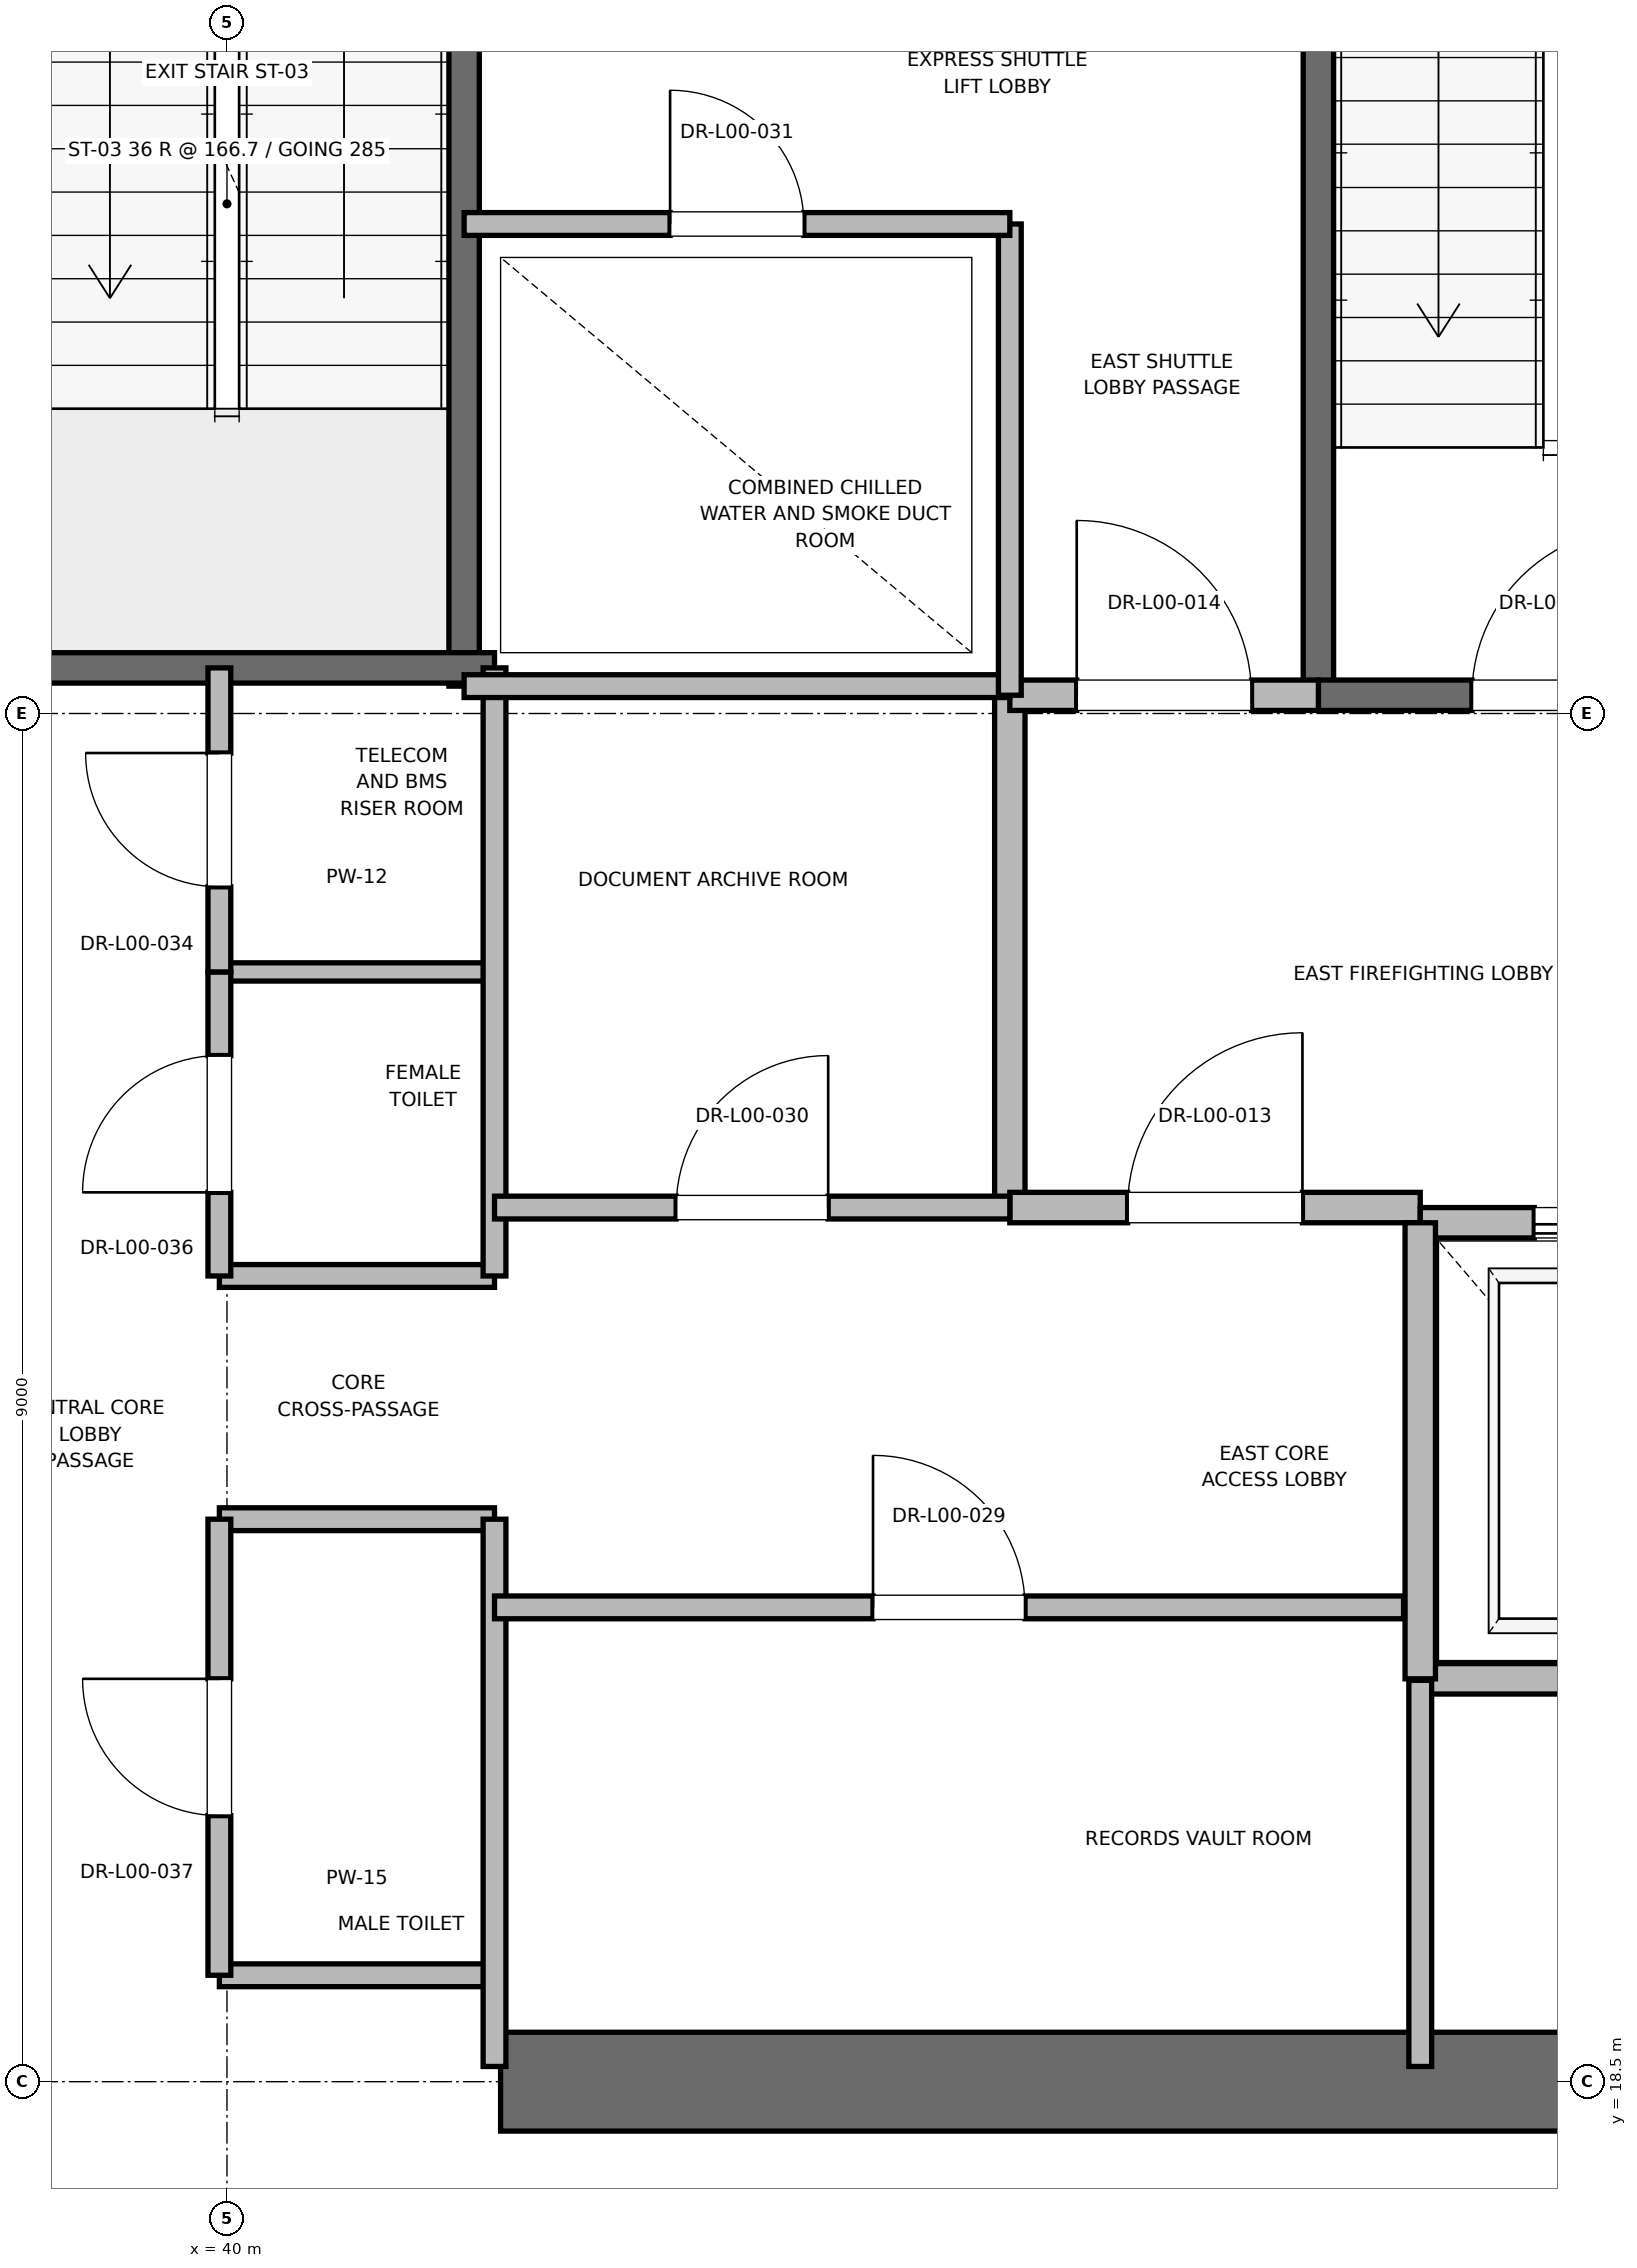
"""IFC4 building model, lengths in metres.
Left out: names, types, materials, properties, quantities, classifications, styles, units other than length and angle.
Written with IfcOpenShell. Run it as: python <this file> out.ifc"""

import sys

from ifc_helpers import new_model, si_unit, direction, frame, frame_2d, origin, place, context, subcontext, project, spatial, rectangle, extrude, element, fill, save


model = new_model("IFC4")
c1 = context("Model", 3, precision=1e-05, world=origin(), true_north=direction((0.0, 1.0)))
c2 = subcontext(c1, "Body", "Model", "MODEL_VIEW")
j1 = project(units=[si_unit("LENGTHUNIT", "METRE"), si_unit("PLANEANGLEUNIT", "RADIAN")], contexts=[c1])
p1 = place(None, origin())
s1 = spatial("IfcSite", under=j1, at=p1, CompositionType="ELEMENT")
p2 = place(p1, origin())
s2 = spatial("IfcBuilding", under=s1, at=p2, CompositionType="ELEMENT")
p3 = place(p2, origin())
s3 = spatial("IfcBuildingStorey", under=s2, at=p3, CompositionType="ELEMENT", Elevation=0.0)
p4 = place(p3, frame((41.8, 18.5, 0.0), z_axis=(0.0, 0.0, 1.0), x_axis=(1.0, 0.0, 0.0)))
e1 = element("IfcWall", 1, at=p4, inside=s3, PredefinedType="SHEAR", context=c2, shape_type="SweptSolid", body=[
    extrude(rectangle(XDim=9.2, YDim=0.65, at=frame_2d((4.6, 0.0))), origin(), (0.0, 0.0, 1.0), 5.72),
])
p5 = place(p3, frame((47.18, 27.62, 0.0), z_axis=(0.0, 0.0, 1.0), x_axis=(0.0, 1.0, 0.0)))
e2 = element("IfcWall", 2, at=p5, inside=s3, PredefinedType="SOLIDWALL", context=c2, shape_type="SweptSolid", body=[
    extrude(rectangle(XDim=8.18, YDim=0.2, at=frame_2d((4.09, 0.0))), origin(), (0.0, 0.0, 1.0), 5.72),
])
p6 = place(p3, frame((47.18, 27.62, 0.0), z_axis=(0.0, 0.0, 1.0), x_axis=(1.0, 0.0, 0.0)))
e3 = element("IfcWall", 3, at=p6, inside=s3, PredefinedType="SOLIDWALL", context=c2, shape_type="SweptSolid", body=[
    extrude(rectangle(XDim=3.12, YDim=0.2, at=frame_2d((1.56, 0.0))), origin(), (0.0, 0.0, 1.0), 5.72),
])
p7 = place(p6, frame((1.01, 0.0, 0.0)))
e4 = element("IfcOpeningElement", 4, at=p7, cuts=e3, PredefinedType="OPENING", context=c2, shape_type="SweptSolid", body=[
    extrude(rectangle(XDim=1.1, YDim=2.15, at=frame_2d((0.55, 1.075))), frame((0.0, 0.1, 0.0), z_axis=(0.0, -1.0, 0.0), x_axis=(1.0, 0.0, 0.0)), (0.0, 0.0, 1.0), 0.2),
])
p8 = place(p3, frame((41.56, 27.68, 0.0), z_axis=(0.0, 0.0, 1.0), x_axis=(0.0, 1.0, 0.0)))
e5 = element("IfcWall", 5, at=p8, inside=s3, PredefinedType="SOLIDWALL", context=c2, shape_type="SweptSolid", body=[
    extrude(rectangle(XDim=8.57, YDim=0.2, at=frame_2d((4.285, 0.0))), origin(), (0.0, 0.0, 1.0), 5.72),
])
p9 = place(p3, frame((38.44, 27.8, 0.0), z_axis=(0.0, 0.0, 1.0), x_axis=(1.0, 0.0, 0.0)))
e6 = element("IfcWall", 6, at=p9, inside=s3, PredefinedType="SOLIDWALL", context=c2, shape_type="SweptSolid", body=[
    extrude(rectangle(XDim=3.32, YDim=0.2, at=frame_2d((1.66, 0.0))), origin(), (0.0, 0.0, 1.0), 5.72),
])
p10 = place(p3, frame((45.15, 24.25, 0.0), z_axis=(0.0, 0.0, 1.0), x_axis=(0.0, 1.0, 0.0)))
e7 = element("IfcWall", 7, at=p10, inside=s3, PredefinedType="PARTITIONING", context=c2, shape_type="SweptSolid", body=[
    extrude(rectangle(XDim=3.37, YDim=0.2, at=frame_2d((1.685, 0.0))), origin(), (0.0, 0.0, 1.0), 5.72),
])
p11 = place(p3, frame((45.15, 24.25, 0.0), z_axis=(0.0, 0.0, 1.0), x_axis=(1.0, 0.0, 0.0)))
e8 = element("IfcWall", 8, at=p11, inside=s3, PredefinedType="PARTITIONING", context=c2, shape_type="SweptSolid", body=[
    extrude(rectangle(XDim=2.7, YDim=0.2, at=frame_2d((1.35, 0.0))), origin(), (0.0, 0.0, 1.0), 5.72),
])
p12 = place(p11, frame((0.775, 0.0, 0.0)))
e9 = element("IfcOpeningElement", 9, at=p12, cuts=e8, PredefinedType="OPENING", context=c2, shape_type="SweptSolid", body=[
    extrude(rectangle(XDim=1.15, YDim=2.2, at=frame_2d((0.575, 1.1))), frame((0.0, 0.1, 0.0), z_axis=(0.0, -1.0, 0.0), x_axis=(1.0, 0.0, 0.0)), (0.0, 0.0, 1.0), 0.2),
])
p13 = place(p3, frame((45.15, 27.62, 0.0), z_axis=(0.0, 0.0, 1.0), x_axis=(1.0, 0.0, 0.0)))
e10 = element("IfcWall", 10, at=p13, inside=s3, PredefinedType="PARTITIONING", context=c2, shape_type="SweptSolid", body=[
    extrude(rectangle(XDim=2.03, YDim=0.2, at=frame_2d((1.015, 0.0))), origin(), (0.0, 0.0, 1.0), 5.72),
])
p14 = place(p13, frame((0.44, 0.0, 0.0)))
e11 = element("IfcOpeningElement", 11, at=p14, cuts=e10, PredefinedType="OPENING", context=c2, shape_type="SweptSolid", body=[
    extrude(rectangle(XDim=1.15, YDim=2.2, at=frame_2d((0.575, 1.1))), frame((0.0, 0.1, 0.0), z_axis=(0.0, -1.0, 0.0), x_axis=(1.0, 0.0, 0.0)), (0.0, 0.0, 1.0), 0.2),
])
p15 = place(p3, frame((47.85, 21.15, 0.0), z_axis=(0.0, 0.0, 1.0), x_axis=(1.0, 0.0, 0.0)))
e12 = element("IfcWall", 12, at=p15, inside=s3, PredefinedType="SOLIDWALL", context=c2, shape_type="SweptSolid", body=[
    extrude(rectangle(XDim=2.6, YDim=0.2, at=frame_2d((1.3, 0.0))), origin(), (0.0, 0.0, 1.0), 5.72),
])
p16 = place(p3, frame((50.45, 24.15, 0.0), z_axis=(0.0, 0.0, 1.0), x_axis=(-1.0, 0.0, 0.0)))
e13 = element("IfcWall", 13, at=p16, inside=s3, PredefinedType="SOLIDWALL", context=c2, shape_type="SweptSolid", body=[
    extrude(rectangle(XDim=2.6, YDim=0.2, at=frame_2d((1.3, 0.0))), origin(), (0.0, 0.0, 1.0), 4.5),
])
p17 = place(p16, frame((0.75, 0.0, 0.0)))
e14 = element("IfcOpeningElement", 14, at=p17, cuts=e13, PredefinedType="OPENING", context=c2, shape_type="SweptSolid", body=[
    extrude(rectangle(XDim=1.1, YDim=2.2, at=frame_2d((0.55, 1.1))), frame((0.0, 0.1, 0.0), z_axis=(0.0, -1.0, 0.0), x_axis=(1.0, 0.0, 0.0)), (0.0, 0.0, 1.0), 0.2),
])
p18 = place(p3, frame((47.85, 24.15, 0.0), z_axis=(0.0, 0.0, 1.0), x_axis=(0.0, -1.0, 0.0)))
e15 = element("IfcWall", 15, at=p18, inside=s3, PredefinedType="SOLIDWALL", context=c2, shape_type="SweptSolid", body=[
    extrude(rectangle(XDim=3.0, YDim=0.2, at=frame_2d((1.5, 0.0))), origin(), (0.0, 0.0, 1.0), 5.72),
])
for number, where, z_axis, x_axis in (
    (16, (39.95, 19.2, 0.0), (0.0, 0.0, 1.0), (1.0, 0.0, 0.0)),
    (17, (39.95, 22.2, 0.0), (0.0, 0.0, 1.0), (1.0, 0.0, 0.0)),
    (18, (39.95, 23.8, 0.0), (0.0, 0.0, 1.0), (1.0, 0.0, 0.0)),
):
    element("IfcWall", number, at=place(p3, frame(where, z_axis=z_axis, x_axis=x_axis)), inside=s3, PredefinedType="PARTITIONING", context=c2, shape_type="SweptSolid", body=[
        extrude(rectangle(XDim=1.81, YDim=0.15, at=frame_2d((0.905, 0.0))), origin(), (0.0, 0.0, 1.0), 2.85),
    ])
p19 = place(p3, frame((39.95, 25.8, 0.0), z_axis=(0.0, 0.0, 1.0), x_axis=(1.0, 0.0, 0.0)))
e19 = element("IfcWall", 19, at=p19, inside=s3, PredefinedType="PARTITIONING", context=c2, shape_type="SweptSolid", body=[
    extrude(rectangle(XDim=1.81, YDim=0.12, at=frame_2d((0.905, 0.0))), origin(), (0.0, 0.0, 1.0), 2.85),
])
p20 = place(p3, frame((41.76, 18.6, 0.0), z_axis=(0.0, 0.0, 1.0), x_axis=(0.0, 1.0, 0.0)))
e20 = element("IfcWall", 20, at=p20, inside=s3, PredefinedType="PARTITIONING", context=c2, shape_type="SweptSolid", body=[
    extrude(rectangle(XDim=3.6, YDim=0.15, at=frame_2d((1.8, 0.0))), origin(), (0.0, 0.0, 1.0), 2.85),
])
p21 = place(p3, frame((41.76, 23.8, 0.0), z_axis=(0.0, 0.0, 1.0), x_axis=(0.0, 1.0, 0.0)))
e21 = element("IfcWall", 21, at=p21, inside=s3, PredefinedType="PARTITIONING", context=c2, shape_type="SweptSolid", body=[
    extrude(rectangle(XDim=4.0, YDim=0.15, at=frame_2d((2.0, 0.0))), origin(), (0.0, 0.0, 1.0), 2.85),
])
p22 = place(p3, frame((39.95, 19.2, 0.0), z_axis=(0.0, 0.0, 1.0), x_axis=(0.0, 1.0, 0.0)))
e22 = element("IfcWall", 22, at=p22, inside=s3, PredefinedType="PARTITIONING", context=c2, shape_type="SweptSolid", body=[
    extrude(rectangle(XDim=3.0, YDim=0.15, at=frame_2d((1.5, 0.0))), origin(), (0.0, 0.0, 1.0), 2.85),
])
p23 = place(p22, frame((1.05, 0.0, 0.0)))
e23 = element("IfcOpeningElement", 23, at=p23, cuts=e22, PredefinedType="OPENING", context=c2, shape_type="SweptSolid", body=[
    extrude(rectangle(XDim=0.9, YDim=2.1, at=frame_2d((0.45, 1.05))), frame((0.0, 0.075, 0.0), z_axis=(0.0, -1.0, 0.0), x_axis=(1.0, 0.0, 0.0)), (0.0, 0.0, 1.0), 0.15),
])
p24 = place(p3, frame((39.95, 23.8, 0.0), z_axis=(0.0, 0.0, 1.0), x_axis=(0.0, 1.0, 0.0)))
e24 = element("IfcWall", 24, at=p24, inside=s3, PredefinedType="PARTITIONING", context=c2, shape_type="SweptSolid", body=[
    extrude(rectangle(XDim=2.0, YDim=0.15, at=frame_2d((1.0, 0.0))), origin(), (0.0, 0.0, 1.0), 2.85),
])
p25 = place(p24, frame((0.55, 0.0, 0.0)))
e25 = element("IfcOpeningElement", 25, at=p25, cuts=e24, PredefinedType="OPENING", context=c2, shape_type="SweptSolid", body=[
    extrude(rectangle(XDim=0.9, YDim=2.1, at=frame_2d((0.45, 1.05))), frame((0.0, 0.075, 0.0), z_axis=(0.0, -1.0, 0.0), x_axis=(1.0, 0.0, 0.0)), (0.0, 0.0, 1.0), 0.15),
])
p26 = place(p3, frame((39.95, 25.8, 0.0), z_axis=(0.0, 0.0, 1.0), x_axis=(0.0, 1.0, 0.0)))
e26 = element("IfcWall", 26, at=p26, inside=s3, PredefinedType="PARTITIONING", context=c2, shape_type="SweptSolid", body=[
    extrude(rectangle(XDim=2.0, YDim=0.15, at=frame_2d((1.0, 0.0))), origin(), (0.0, 0.0, 1.0), 2.85),
])
p27 = place(p26, frame((0.56, 0.0, 0.0)))
e27 = element("IfcOpeningElement", 27, at=p27, cuts=e26, PredefinedType="OPENING", context=c2, shape_type="SweptSolid", body=[
    extrude(rectangle(XDim=0.88, YDim=2.1, at=frame_2d((0.44, 1.05))), frame((0.0, 0.075, 0.0), z_axis=(0.0, -1.0, 0.0), x_axis=(1.0, 0.0, 0.0)), (0.0, 0.0, 1.0), 0.15),
])
p28 = place(p3, frame((41.56, 27.68, 0.0), z_axis=(0.0, 0.0, 1.0), x_axis=(1.0, 0.0, 0.0)))
e28 = element("IfcWall", 28, at=p28, inside=s3, PredefinedType="PARTITIONING", context=c2, shape_type="SweptSolid", body=[
    extrude(rectangle(XDim=3.59, YDim=0.15, at=frame_2d((1.795, 0.0))), origin(), (0.0, 0.0, 1.0), 2.85),
])
p29 = place(p3, frame((47.85, 18.6, 0.0), z_axis=(0.0, 0.0, 1.0), x_axis=(0.0, 1.0, 0.0)))
e29 = element("IfcWall", 29, at=p29, inside=s3, PredefinedType="PARTITIONING", context=c2, shape_type="SweptSolid", body=[
    extrude(rectangle(XDim=2.54, YDim=0.15, at=frame_2d((1.27, 0.0))), origin(), (0.0, 0.0, 1.0), 2.85),
])
p30 = place(p3, frame((41.76, 21.62, 0.0), z_axis=(0.0, 0.0, 1.0), x_axis=(1.0, 0.0, 0.0)))
e30 = element("IfcWall", 30, at=p30, inside=s3, PredefinedType="PARTITIONING", context=c2, shape_type="SweptSolid", body=[
    extrude(rectangle(XDim=5.98, YDim=0.15, at=frame_2d((2.99, 0.0))), origin(), (0.0, 0.0, 1.0), 2.85),
])
p31 = place(p30, frame((2.49, 0.0, 0.0)))
e31 = element("IfcOpeningElement", 31, at=p31, cuts=e30, PredefinedType="OPENING", context=c2, shape_type="SweptSolid", body=[
    extrude(rectangle(XDim=1.0, YDim=2.15, at=frame_2d((0.5, 1.075))), frame((0.0, 0.075, 0.0), z_axis=(0.0, -1.0, 0.0), x_axis=(1.0, 0.0, 0.0)), (0.0, 0.0, 1.0), 0.15),
])
p32 = place(p3, frame((41.76, 24.25, 0.0), z_axis=(0.0, 0.0, 1.0), x_axis=(1.0, 0.0, 0.0)))
e32 = element("IfcWall", 32, at=p32, inside=s3, PredefinedType="PARTITIONING", context=c2, shape_type="SweptSolid", body=[
    extrude(rectangle(XDim=3.39, YDim=0.15, at=frame_2d((1.695, 0.0))), origin(), (0.0, 0.0, 1.0), 2.85),
])
p33 = place(p32, frame((1.195, 0.0, 0.0)))
e33 = element("IfcOpeningElement", 33, at=p33, cuts=e32, PredefinedType="OPENING", context=c2, shape_type="SweptSolid", body=[
    extrude(rectangle(XDim=1.0, YDim=2.15, at=frame_2d((0.5, 1.075))), frame((0.0, 0.075, 0.0), z_axis=(0.0, -1.0, 0.0), x_axis=(1.0, 0.0, 0.0)), (0.0, 0.0, 1.0), 0.15),
])
p34 = place(p3, frame((45.15, 27.62, 0.0), z_axis=(0.0, 0.0, 1.0), x_axis=(0.0, 1.0, 0.0)))
e34 = element("IfcWall", 34, at=p34, inside=s3, PredefinedType="PARTITIONING", context=c2, shape_type="SweptSolid", body=[
    extrude(rectangle(XDim=3.1, YDim=0.15, at=frame_2d((1.55, 0.0))), origin(), (0.0, 0.0, 1.0), 2.85),
])
p35 = place(p3, frame((41.56, 30.72, 0.0), z_axis=(0.0, 0.0, 1.0), x_axis=(1.0, 0.0, 0.0)))
e35 = element("IfcWall", 35, at=p35, inside=s3, PredefinedType="PARTITIONING", context=c2, shape_type="SweptSolid", body=[
    extrude(rectangle(XDim=3.59, YDim=0.15, at=frame_2d((1.795, 0.0))), origin(), (0.0, 0.0, 1.0), 2.85),
])
p36 = place(p35, frame((1.355, 0.0, 0.0)))
e36 = element("IfcOpeningElement", 36, at=p36, cuts=e35, PredefinedType="OPENING", context=c2, shape_type="SweptSolid", body=[
    extrude(rectangle(XDim=0.88, YDim=2.1, at=frame_2d((0.44, 1.05))), frame((0.0, 0.075, 0.0), z_axis=(0.0, -1.0, 0.0), x_axis=(1.0, 0.0, 0.0)), (0.0, 0.0, 1.0), 0.15),
])
p37 = place(p7, origin())
e37 = element("IfcDoor", 37, at=p37, inside=s3, OperationType="SINGLE_SWING_RIGHT", PredefinedType="DOOR", context=c2, shape_type="SweptSolid", body=[
    extrude(rectangle(XDim=1.1, YDim=2.15, at=frame_2d((0.55, 1.075))), frame((0.0, 0.025, 0.0), z_axis=(0.0, -1.0, 0.0), x_axis=(1.0, 0.0, 0.0)), (0.0, 0.0, 1.0), 0.05),
])
fill(e4, e37)
p38 = place(p12, origin())
e38 = element("IfcDoor", 38, at=p38, inside=s3, OperationType="SINGLE_SWING_RIGHT", PredefinedType="DOOR", context=c2, shape_type="SweptSolid", body=[
    extrude(rectangle(XDim=1.15, YDim=2.2, at=frame_2d((0.575, 1.1))), frame((0.0, 0.025, 0.0), z_axis=(0.0, -1.0, 0.0), x_axis=(1.0, 0.0, 0.0)), (0.0, 0.0, 1.0), 0.05),
])
fill(e9, e38)
p39 = place(p14, origin())
e39 = element("IfcDoor", 39, at=p39, inside=s3, OperationType="SINGLE_SWING_LEFT", PredefinedType="DOOR", context=c2, shape_type="SweptSolid", body=[
    extrude(rectangle(XDim=1.15, YDim=2.2, at=frame_2d((0.575, 1.1))), frame((0.0, 0.025, 0.0), z_axis=(0.0, -1.0, 0.0), x_axis=(1.0, 0.0, 0.0)), (0.0, 0.0, 1.0), 0.05),
])
fill(e11, e39)
p40 = place(p17, origin())
e40 = element("IfcDoor", 40, at=p40, inside=s3, OperationType="SLIDING_TO_RIGHT", PredefinedType="DOOR", context=c2, shape_type="SweptSolid", body=[
    extrude(rectangle(XDim=1.1, YDim=2.2, at=frame_2d((0.55, 1.1))), frame((0.0, 0.025, 0.0), z_axis=(0.0, -1.0, 0.0), x_axis=(1.0, 0.0, 0.0)), (0.0, 0.0, 1.0), 0.05),
])
fill(e14, e40)
p41 = place(p23, origin())
e41 = element("IfcDoor", 41, at=p41, inside=s3, OperationType="SINGLE_SWING_RIGHT", PredefinedType="DOOR", context=c2, shape_type="SweptSolid", body=[
    extrude(rectangle(XDim=0.9, YDim=2.1, at=frame_2d((0.45, 1.05))), frame((0.0, 0.025, 0.0), z_axis=(0.0, -1.0, 0.0), x_axis=(1.0, 0.0, 0.0)), (0.0, 0.0, 1.0), 0.05),
])
fill(e23, e41)
p42 = place(p25, origin())
e42 = element("IfcDoor", 42, at=p42, inside=s3, OperationType="SINGLE_SWING_LEFT", PredefinedType="DOOR", context=c2, shape_type="SweptSolid", body=[
    extrude(rectangle(XDim=0.9, YDim=2.1, at=frame_2d((0.45, 1.05))), frame((0.0, 0.025, 0.0), z_axis=(0.0, -1.0, 0.0), x_axis=(1.0, 0.0, 0.0)), (0.0, 0.0, 1.0), 0.05),
])
fill(e25, e42)
p43 = place(p27, origin())
e43 = element("IfcDoor", 43, at=p43, inside=s3, OperationType="SINGLE_SWING_RIGHT", PredefinedType="DOOR", context=c2, shape_type="SweptSolid", body=[
    extrude(rectangle(XDim=0.88, YDim=2.1, at=frame_2d((0.44, 1.05))), frame((0.0, 0.025, 0.0), z_axis=(0.0, -1.0, 0.0), x_axis=(1.0, 0.0, 0.0)), (0.0, 0.0, 1.0), 0.05),
])
fill(e27, e43)
p44 = place(p31, origin())
e44 = element("IfcDoor", 44, at=p44, inside=s3, OperationType="SINGLE_SWING_LEFT", PredefinedType="DOOR", context=c2, shape_type="SweptSolid", body=[
    extrude(rectangle(XDim=1.0, YDim=2.15, at=frame_2d((0.5, 1.075))), frame((0.0, 0.025, 0.0), z_axis=(0.0, -1.0, 0.0), x_axis=(1.0, 0.0, 0.0)), (0.0, 0.0, 1.0), 0.05),
])
fill(e31, e44)
p45 = place(p33, origin())
e45 = element("IfcDoor", 45, at=p45, inside=s3, OperationType="SINGLE_SWING_RIGHT", PredefinedType="DOOR", context=c2, shape_type="SweptSolid", body=[
    extrude(rectangle(XDim=1.0, YDim=2.15, at=frame_2d((0.5, 1.075))), frame((0.0, 0.025, 0.0), z_axis=(0.0, -1.0, 0.0), x_axis=(1.0, 0.0, 0.0)), (0.0, 0.0, 1.0), 0.05),
])
fill(e33, e45)
p46 = place(p36, origin())
e46 = element("IfcDoor", 46, at=p46, inside=s3, OperationType="SINGLE_SWING_LEFT", PredefinedType="DOOR", context=c2, shape_type="SweptSolid", body=[
    extrude(rectangle(XDim=0.88, YDim=2.1, at=frame_2d((0.44, 1.05))), frame((0.0, 0.025, 0.0), z_axis=(0.0, -1.0, 0.0), x_axis=(1.0, 0.0, 0.0)), (0.0, 0.0, 1.0), 0.05),
])
fill(e36, e46)
save(model, sys.argv[1])
